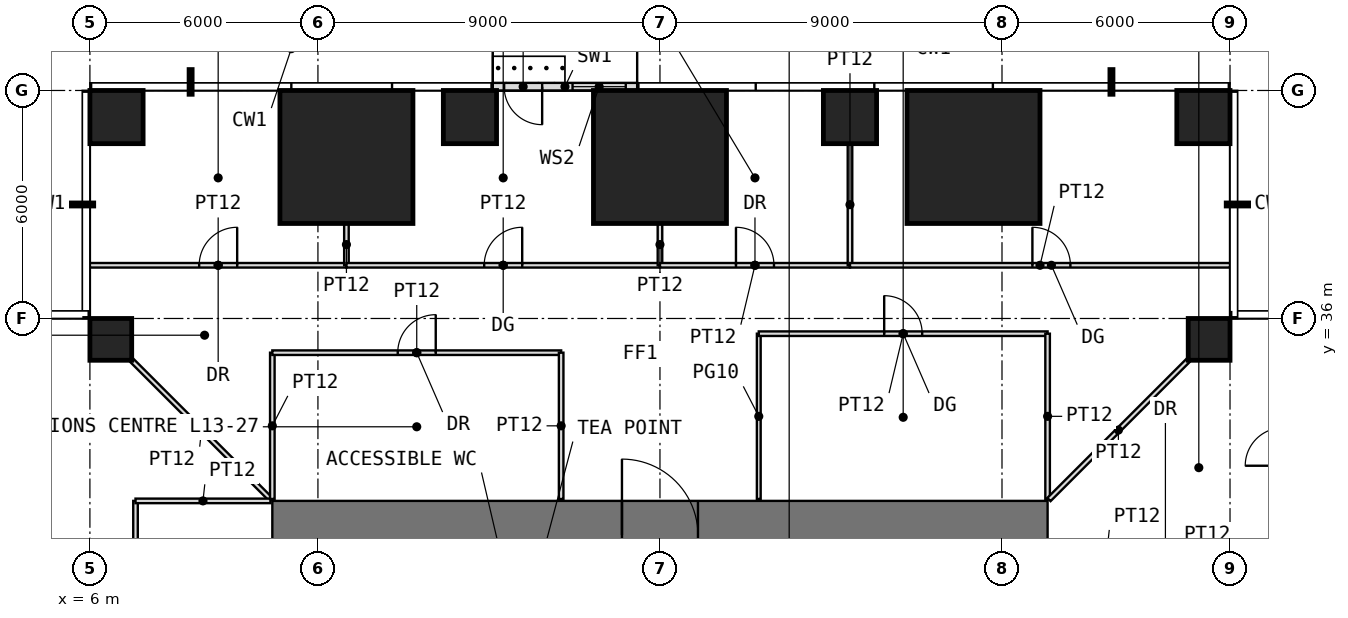
"""IFC4 building model, lengths in metres.
Left out: names, types, materials, properties, quantities, classifications, styles, units other than length and angle.
Written with IfcOpenShell. Run it as: python <this file> out.ifc"""

import sys

from ifc_helpers import new_model, si_unit, direction, frame, frame_2d, origin, origin_2d, place, context, subcontext, project, spatial, rectangle, extrude, element, fill, save


model = new_model("IFC4")
c1 = context("Model", 3, precision=1e-05, world=origin(), true_north=direction((0.0, 1.0)))
c2 = subcontext(c1, "Body", "Model", "MODEL_VIEW")
j1 = project(units=[si_unit("LENGTHUNIT", "METRE"), si_unit("PLANEANGLEUNIT", "RADIAN")], contexts=[c1])
p1 = place(None, origin())
s1 = spatial("IfcSite", under=j1, at=p1, CompositionType="ELEMENT")
p2 = place(p1, origin())
s2 = spatial("IfcBuilding", under=s1, at=p2, CompositionType="ELEMENT")
p3 = place(p2, frame((0.0, 0.0, 58.5)))
s3 = spatial("IfcBuildingStorey", under=s2, at=p3, CompositionType="ELEMENT", Elevation=58.5)
for number, where, z_axis, x_axis in (
    (1, (6.55, 35.45, 0.0), (0.0, 0.0, 1.0), (1.0, 0.0, 0.0)),
    (2, (35.45, 35.45, 0.0), (0.0, 0.0, 1.0), (1.0, 0.0, 0.0)),
):
    element("IfcColumn", number, at=place(p3, frame(where, z_axis=z_axis, x_axis=x_axis)), inside=s3, PredefinedType="COLUMN", context=c2, shape_type="SweptSolid", body=[
        extrude(rectangle(XDim=1.1, YDim=1.1, at=origin_2d()), origin(), (0.0, 0.0, 1.0), 4.0),
    ])
p4 = place(p3, frame((6.7, 41.3, 0.0), z_axis=(0.0, 0.0, 1.0), x_axis=(1.0, 0.0, 0.0)))
e3 = element("IfcColumn", 3, at=p4, inside=s3, PredefinedType="COLUMN", context=c2, shape_type="SweptSolid", body=[
    extrude(rectangle(XDim=1.4, YDim=1.4, at=origin_2d()), origin(), (0.0, 0.0, 1.0), 4.0),
])
p5 = place(p3, frame((12.75, 40.25, 0.0), z_axis=(0.0, 0.0, 1.0), x_axis=(1.0, 0.0, 0.0)))
e4 = element("IfcColumn", 4, at=p5, inside=s3, PredefinedType="COLUMN", context=c2, shape_type="SweptSolid", body=[
    extrude(rectangle(XDim=3.5, YDim=3.5, at=origin_2d()), origin(), (0.0, 0.0, 1.0), 4.0),
])
p6 = place(p3, frame((16.0, 41.3, 0.0), z_axis=(0.0, 0.0, 1.0), x_axis=(1.0, 0.0, 0.0)))
e5 = element("IfcColumn", 5, at=p6, inside=s3, PredefinedType="COLUMN", context=c2, shape_type="SweptSolid", body=[
    extrude(rectangle(XDim=1.4, YDim=1.4, at=origin_2d()), origin(), (0.0, 0.0, 1.0), 4.0),
])
p7 = place(p3, frame((21.0, 40.25, 0.0), z_axis=(0.0, 0.0, 1.0), x_axis=(1.0, 0.0, 0.0)))
e6 = element("IfcColumn", 6, at=p7, inside=s3, PredefinedType="COLUMN", context=c2, shape_type="SweptSolid", body=[
    extrude(rectangle(XDim=3.5, YDim=3.5, at=origin_2d()), origin(), (0.0, 0.0, 1.0), 4.0),
])
p8 = place(p3, frame((26.0, 41.3, 0.0), z_axis=(0.0, 0.0, 1.0), x_axis=(1.0, 0.0, 0.0)))
e7 = element("IfcColumn", 7, at=p8, inside=s3, PredefinedType="COLUMN", context=c2, shape_type="SweptSolid", body=[
    extrude(rectangle(XDim=1.4, YDim=1.4, at=origin_2d()), origin(), (0.0, 0.0, 1.0), 4.0),
])
p9 = place(p3, frame((29.25, 40.25, 0.0), z_axis=(0.0, 0.0, 1.0), x_axis=(1.0, 0.0, 0.0)))
e8 = element("IfcColumn", 8, at=p9, inside=s3, PredefinedType="COLUMN", context=c2, shape_type="SweptSolid", body=[
    extrude(rectangle(XDim=3.5, YDim=3.5, at=origin_2d()), origin(), (0.0, 0.0, 1.0), 4.0),
])
p10 = place(p3, frame((35.3, 41.3, 0.0), z_axis=(0.0, 0.0, 1.0), x_axis=(1.0, 0.0, 0.0)))
e9 = element("IfcColumn", 9, at=p10, inside=s3, PredefinedType="COLUMN", context=c2, shape_type="SweptSolid", body=[
    extrude(rectangle(XDim=1.4, YDim=1.4, at=origin_2d()), origin(), (0.0, 0.0, 1.0), 4.0),
])
p11 = place(p3, frame((20.4, 42.1, 0.0), z_axis=(0.0, 0.0, 1.0), x_axis=(-1.0, 0.0, 0.0)))
e10 = element("IfcWall", 10, at=p11, inside=s3, PredefinedType="USERDEFINED", context=c2, shape_type="SweptSolid", body=[
    extrude(rectangle(XDim=3.8, YDim=0.2, at=frame_2d((1.9, 0.0))), origin(), (0.0, 0.0, 1.0), 3.75),
])
p12 = place(p11, frame((2.5, 0.0, 0.0)))
e11 = element("IfcOpeningElement", 11, at=p12, cuts=e10, PredefinedType="OPENING", context=c2, shape_type="SweptSolid", body=[
    extrude(rectangle(XDim=1.0, YDim=2.4, at=frame_2d((0.5, 1.2))), frame((0.0, 0.11, 0.0), z_axis=(0.0, -1.0, 0.0), x_axis=(1.0, 0.0, 0.0)), (0.0, 0.0, 1.0), 0.22),
])
p13 = place(p11, frame((0.3, 0.0, 0.3)))
e12 = element("IfcOpeningElement", 12, at=p13, cuts=e10, PredefinedType="OPENING", context=c2, shape_type="SweptSolid", body=[
    extrude(rectangle(XDim=1.4, YDim=2.7, at=frame_2d((0.7, 1.35))), frame((0.0, 0.11, 0.0), z_axis=(0.0, -1.0, 0.0), x_axis=(1.0, 0.0, 0.0)), (0.0, 0.0, 1.0), 0.22),
])
p14 = place(p3, frame((10.8, 30.3, -0.05), z_axis=(0.0, 0.0, 1.0), x_axis=(1.0, 0.0, 0.0)))
e13 = element("IfcWall", 13, at=p14, inside=s3, PredefinedType="SHEAR", context=c2, shape_type="SweptSolid", body=[
    extrude(rectangle(XDim=20.4, YDim=1.8, at=frame_2d((10.2, 0.0))), origin(), (0.0, 0.0, 1.0), 4.0),
])
p15 = place(p14, frame((9.2, 0.0, 0.05)))
e14 = element("IfcOpeningElement", 14, at=p15, cuts=e13, PredefinedType="OPENING", context=c2, shape_type="SweptSolid", body=[
    extrude(rectangle(XDim=2.0, YDim=2.2, at=frame_2d((1.0, 1.1))), frame((0.0, 0.91, 0.0), z_axis=(0.0, -1.0, 0.0), x_axis=(1.0, 0.0, 0.0)), (0.0, 0.0, 1.0), 1.82),
])
p16 = place(p3, frame((6.0, 37.4, 0.0), z_axis=(0.0, 0.0, 1.0), x_axis=(1.0, 0.0, 0.0)))
e15 = element("IfcWall", 15, at=p16, inside=s3, PredefinedType="PARTITIONING", context=c2, shape_type="SweptSolid", body=[
    extrude(rectangle(XDim=6.75, YDim=0.12, at=frame_2d((3.375, 0.0))), origin(), (0.0, 0.0, 1.0), 3.75),
])
p17 = place(p16, frame((2.875, 0.0, 0.0)))
e16 = element("IfcOpeningElement", 16, at=p17, cuts=e15, PredefinedType="OPENING", context=c2, shape_type="SweptSolid", body=[
    extrude(rectangle(XDim=1.0, YDim=2.2, at=frame_2d((0.5, 1.1))), frame((0.0, 0.07, 0.0), z_axis=(0.0, -1.0, 0.0), x_axis=(1.0, 0.0, 0.0)), (0.0, 0.0, 1.0), 0.14),
])
p18 = place(p3, frame((7.11, 34.89, 0.0), z_axis=(0.0, 0.0, 1.0), x_axis=(0.707106781187, -0.707106781187, 0.0)))
e17 = element("IfcWall", 17, at=p18, inside=s3, PredefinedType="PARTITIONING", context=c2, shape_type="SweptSolid", body=[
    extrude(rectangle(XDim=5.168, YDim=0.12, at=frame_2d((2.584, 0.0))), origin(), (0.0, 0.0, 1.0), 3.75),
])
p19 = place(p3, frame((7.2, 24.6, 0.0), z_axis=(0.0, 0.0, 1.0), x_axis=(0.0, 1.0, 0.0)))
e18 = element("IfcWall", 18, at=p19, inside=s3, PredefinedType="PARTITIONING", context=c2, shape_type="SweptSolid", body=[
    extrude(rectangle(XDim=6.6, YDim=0.12, at=frame_2d((3.3, 0.0))), origin(), (0.0, 0.0, 1.0), 3.75),
])
p20 = place(p19, frame((2.8, 0.0, 0.0)))
e19 = element("IfcOpeningElement", 19, at=p20, cuts=e18, PredefinedType="OPENING", context=c2, shape_type="SweptSolid", body=[
    extrude(rectangle(XDim=1.0, YDim=2.4, at=frame_2d((0.5, 1.2))), frame((0.0, 0.07, 0.0), z_axis=(0.0, -1.0, 0.0), x_axis=(1.0, 0.0, 0.0)), (0.0, 0.0, 1.0), 0.14),
])
p21 = place(p3, frame((7.2, 31.2, 0.0), z_axis=(0.0, 0.0, 1.0), x_axis=(1.0, 0.0, 0.0)))
e20 = element("IfcWall", 20, at=p21, inside=s3, PredefinedType="PARTITIONING", context=c2, shape_type="SweptSolid", body=[
    extrude(rectangle(XDim=3.55, YDim=0.12, at=frame_2d((1.775, 0.0))), origin(), (0.0, 0.0, 1.0), 3.75),
])
p22 = place(p3, frame((10.8, 31.25, 0.0), z_axis=(0.0, 0.0, 1.0), x_axis=(0.0, 1.0, 0.0)))
e21 = element("IfcWall", 21, at=p22, inside=s3, PredefinedType="PARTITIONING", context=c2, shape_type="SweptSolid", body=[
    extrude(rectangle(XDim=3.85, YDim=0.12, at=frame_2d((1.925, 0.0))), origin(), (0.0, 0.0, 1.0), 3.75),
])
p23 = place(p3, frame((10.8, 35.1, 0.0), z_axis=(0.0, 0.0, 1.0), x_axis=(1.0, 0.0, 0.0)))
e22 = element("IfcWall", 22, at=p23, inside=s3, PredefinedType="PARTITIONING", context=c2, shape_type="SweptSolid", body=[
    extrude(rectangle(XDim=7.6, YDim=0.12, at=frame_2d((3.8, 0.0))), origin(), (0.0, 0.0, 1.0), 3.75),
])
p24 = place(p23, frame((3.3, 0.0, 0.0)))
e23 = element("IfcOpeningElement", 23, at=p24, cuts=e22, PredefinedType="OPENING", context=c2, shape_type="SweptSolid", body=[
    extrude(rectangle(XDim=1.0, YDim=2.2, at=frame_2d((0.5, 1.1))), frame((0.0, 0.07, 0.0), z_axis=(0.0, -1.0, 0.0), x_axis=(1.0, 0.0, 0.0)), (0.0, 0.0, 1.0), 0.14),
])
p25 = place(p3, frame((12.75, 37.4, 0.0), z_axis=(0.0, 0.0, 1.0), x_axis=(0.0, 1.0, 0.0)))
e24 = element("IfcWall", 24, at=p25, inside=s3, PredefinedType="PARTITIONING", context=c2, shape_type="SweptSolid", body=[
    extrude(rectangle(XDim=1.09, YDim=0.12, at=frame_2d((0.545, 0.0))), origin(), (0.0, 0.0, 1.0), 3.75),
])
p26 = place(p3, frame((12.75, 37.4, 0.0), z_axis=(0.0, 0.0, 1.0), x_axis=(1.0, 0.0, 0.0)))
e25 = element("IfcWall", 25, at=p26, inside=s3, PredefinedType="PARTITIONING", context=c2, shape_type="SweptSolid", body=[
    extrude(rectangle(XDim=8.25, YDim=0.12, at=frame_2d((4.125, 0.0))), origin(), (0.0, 0.0, 1.0), 3.75),
])
p27 = place(p26, frame((3.625, 0.0, 0.0)))
e26 = element("IfcOpeningElement", 26, at=p27, cuts=e25, PredefinedType="OPENING", context=c2, shape_type="SweptSolid", body=[
    extrude(rectangle(XDim=1.0, YDim=2.4, at=frame_2d((0.5, 1.2))), frame((0.0, 0.07, 0.0), z_axis=(0.0, -1.0, 0.0), x_axis=(1.0, 0.0, 0.0)), (0.0, 0.0, 1.0), 0.14),
])
p28 = place(p3, frame((18.4, 31.25, 0.0), z_axis=(0.0, 0.0, 1.0), x_axis=(0.0, 1.0, 0.0)))
e27 = element("IfcWall", 27, at=p28, inside=s3, PredefinedType="PARTITIONING", context=c2, shape_type="SweptSolid", body=[
    extrude(rectangle(XDim=3.85, YDim=0.12, at=frame_2d((1.925, 0.0))), origin(), (0.0, 0.0, 1.0), 3.75),
])
p29 = place(p3, frame((21.0, 37.4, 0.0), z_axis=(0.0, 0.0, 1.0), x_axis=(0.0, 1.0, 0.0)))
e28 = element("IfcWall", 28, at=p29, inside=s3, PredefinedType="PARTITIONING", context=c2, shape_type="SweptSolid", body=[
    extrude(rectangle(XDim=1.09, YDim=0.12, at=frame_2d((0.545, 0.0))), origin(), (0.0, 0.0, 1.0), 3.75),
])
p30 = place(p3, frame((21.0, 37.4, 0.0), z_axis=(0.0, 0.0, 1.0), x_axis=(1.0, 0.0, 0.0)))
e29 = element("IfcWall", 29, at=p30, inside=s3, PredefinedType="PARTITIONING", context=c2, shape_type="SweptSolid", body=[
    extrude(rectangle(XDim=5.0, YDim=0.12, at=frame_2d((2.5, 0.0))), origin(), (0.0, 0.0, 1.0), 3.75),
])
p31 = place(p30, frame((2.0, 0.0, 0.0)))
e30 = element("IfcOpeningElement", 30, at=p31, cuts=e29, PredefinedType="OPENING", context=c2, shape_type="SweptSolid", body=[
    extrude(rectangle(XDim=1.0, YDim=2.2, at=frame_2d((0.5, 1.1))), frame((0.0, 0.07, 0.0), z_axis=(0.0, -1.0, 0.0), x_axis=(1.0, 0.0, 0.0)), (0.0, 0.0, 1.0), 0.14),
])
p32 = place(p3, frame((23.6, 31.25, 0.0), z_axis=(0.0, 0.0, 1.0), x_axis=(0.0, 1.0, 0.0)))
e31 = element("IfcWall", 31, at=p32, inside=s3, PredefinedType="PARTITIONING", context=c2, shape_type="SweptSolid", body=[
    extrude(rectangle(XDim=4.35, YDim=0.1, at=frame_2d((2.175, 0.0))), origin(), (0.0, 0.0, 1.0), 3.75),
])
p33 = place(p3, frame((23.6, 35.6, 0.0), z_axis=(0.0, 0.0, 1.0), x_axis=(1.0, 0.0, 0.0)))
e32 = element("IfcWall", 32, at=p33, inside=s3, PredefinedType="PARTITIONING", context=c2, shape_type="SweptSolid", body=[
    extrude(rectangle(XDim=7.6, YDim=0.12, at=frame_2d((3.8, 0.0))), origin(), (0.0, 0.0, 1.0), 3.75),
])
p34 = place(p33, frame((3.3, 0.0, 0.0)))
e33 = element("IfcOpeningElement", 33, at=p34, cuts=e32, PredefinedType="OPENING", context=c2, shape_type="SweptSolid", body=[
    extrude(rectangle(XDim=1.0, YDim=2.4, at=frame_2d((0.5, 1.2))), frame((0.0, 0.07, 0.0), z_axis=(0.0, -1.0, 0.0), x_axis=(1.0, 0.0, 0.0)), (0.0, 0.0, 1.0), 0.14),
])
p35 = place(p3, frame((26.0, 37.4, 0.0), z_axis=(0.0, 0.0, 1.0), x_axis=(0.0, 1.0, 0.0)))
e34 = element("IfcWall", 34, at=p35, inside=s3, PredefinedType="PARTITIONING", context=c2, shape_type="SweptSolid", body=[
    extrude(rectangle(XDim=3.19, YDim=0.12, at=frame_2d((1.595, 0.0))), origin(), (0.0, 0.0, 1.0), 3.75),
])
p36 = place(p3, frame((26.0, 37.4, 0.0), z_axis=(0.0, 0.0, 1.0), x_axis=(1.0, 0.0, 0.0)))
e35 = element("IfcWall", 35, at=p36, inside=s3, PredefinedType="PARTITIONING", context=c2, shape_type="SweptSolid", body=[
    extrude(rectangle(XDim=10.0, YDim=0.12, at=frame_2d((5.0, 0.0))), origin(), (0.0, 0.0, 1.0), 3.75),
])
p37 = place(p36, frame((4.8, 0.0, 0.0)))
e36 = element("IfcOpeningElement", 36, at=p37, cuts=e35, PredefinedType="OPENING", context=c2, shape_type="SweptSolid", body=[
    extrude(rectangle(XDim=1.0, YDim=2.4, at=frame_2d((0.5, 1.2))), frame((0.0, 0.07, 0.0), z_axis=(0.0, -1.0, 0.0), x_axis=(1.0, 0.0, 0.0)), (0.0, 0.0, 1.0), 0.14),
])
p38 = place(p3, frame((31.2, 31.25, 0.0), z_axis=(0.0, 0.0, 1.0), x_axis=(0.0, 1.0, 0.0)))
e37 = element("IfcWall", 37, at=p38, inside=s3, PredefinedType="PARTITIONING", context=c2, shape_type="SweptSolid", body=[
    extrude(rectangle(XDim=4.35, YDim=0.12, at=frame_2d((2.175, 0.0))), origin(), (0.0, 0.0, 1.0), 3.75),
])
p39 = place(p3, frame((31.235, 31.235, 0.0), z_axis=(0.0, 0.0, 1.0), x_axis=(0.707106781187, 0.707106781187, 0.0)))
e38 = element("IfcWall", 38, at=p39, inside=s3, PredefinedType="PARTITIONING", context=c2, shape_type="SweptSolid", body=[
    extrude(rectangle(XDim=5.168, YDim=0.12, at=frame_2d((2.584, 0.0))), origin(), (0.0, 0.0, 1.0), 3.75),
])
p40 = place(p12, origin())
e39 = element("IfcDoor", 39, at=p40, inside=s3, OperationType="SINGLE_SWING_LEFT", PredefinedType="DOOR", context=c2, shape_type="SweptSolid", body=[
    extrude(rectangle(XDim=1.0, YDim=2.4, at=frame_2d((0.5, 1.2))), frame((0.0, 0.025, 0.0), z_axis=(0.0, -1.0, 0.0), x_axis=(1.0, 0.0, 0.0)), (0.0, 0.0, 1.0), 0.05),
])
fill(e11, e39)
p41 = place(p13, origin())
e40 = element("IfcWindow", 40, at=p41, inside=s3, PartitioningType="SINGLE_PANEL", PredefinedType="WINDOW", context=c2, shape_type="SweptSolid", body=[
    extrude(rectangle(XDim=1.4, YDim=2.7, at=frame_2d((0.7, 1.35))), frame((0.0, 0.03, 0.0), z_axis=(0.0, -1.0, 0.0), x_axis=(1.0, 0.0, 0.0)), (0.0, 0.0, 1.0), 0.06),
])
fill(e12, e40)
p42 = place(p15, origin())
e41 = element("IfcDoor", 41, at=p42, inside=s3, OperationType="DOUBLE_DOOR_SINGLE_SWING", PredefinedType="DOOR", context=c2, shape_type="SweptSolid", body=[
    extrude(rectangle(XDim=2.0, YDim=2.2, at=frame_2d((1.0, 1.1))), frame((0.0, 0.025, 0.0), z_axis=(0.0, -1.0, 0.0), x_axis=(1.0, 0.0, 0.0)), (0.0, 0.0, 1.0), 0.05),
])
fill(e14, e41)
p43 = place(p24, origin())
e42 = element("IfcDoor", 42, at=p43, inside=s3, OperationType="SINGLE_SWING_RIGHT", PredefinedType="DOOR", context=c2, shape_type="SweptSolid", body=[
    extrude(rectangle(XDim=1.0, YDim=2.2, at=frame_2d((0.5, 1.1))), frame((0.0, 0.025, 0.0), z_axis=(0.0, -1.0, 0.0), x_axis=(1.0, 0.0, 0.0)), (0.0, 0.0, 1.0), 0.05),
])
fill(e23, e42)
p44 = place(p34, origin())
e43 = element("IfcDoor", 43, at=p44, inside=s3, OperationType="SINGLE_SWING_LEFT", PredefinedType="DOOR", context=c2, shape_type="SweptSolid", body=[
    extrude(rectangle(XDim=1.0, YDim=2.4, at=frame_2d((0.5, 1.2))), frame((0.0, 0.025, 0.0), z_axis=(0.0, -1.0, 0.0), x_axis=(1.0, 0.0, 0.0)), (0.0, 0.0, 1.0), 0.05),
])
fill(e33, e43)
p45 = place(p17, origin())
e44 = element("IfcDoor", 44, at=p45, inside=s3, OperationType="SINGLE_SWING_RIGHT", PredefinedType="DOOR", context=c2, shape_type="SweptSolid", body=[
    extrude(rectangle(XDim=1.0, YDim=2.2, at=frame_2d((0.5, 1.1))), frame((0.0, 0.025, 0.0), z_axis=(0.0, -1.0, 0.0), x_axis=(1.0, 0.0, 0.0)), (0.0, 0.0, 1.0), 0.05),
])
fill(e16, e44)
p46 = place(p31, origin())
e45 = element("IfcDoor", 45, at=p46, inside=s3, OperationType="SINGLE_SWING_LEFT", PredefinedType="DOOR", context=c2, shape_type="SweptSolid", body=[
    extrude(rectangle(XDim=1.0, YDim=2.2, at=frame_2d((0.5, 1.1))), frame((0.0, 0.025, 0.0), z_axis=(0.0, -1.0, 0.0), x_axis=(1.0, 0.0, 0.0)), (0.0, 0.0, 1.0), 0.05),
])
fill(e30, e45)
p47 = place(p27, origin())
e46 = element("IfcDoor", 46, at=p47, inside=s3, OperationType="SINGLE_SWING_RIGHT", PredefinedType="DOOR", context=c2, shape_type="SweptSolid", body=[
    extrude(rectangle(XDim=1.0, YDim=2.4, at=frame_2d((0.5, 1.2))), frame((0.0, 0.025, 0.0), z_axis=(0.0, -1.0, 0.0), x_axis=(1.0, 0.0, 0.0)), (0.0, 0.0, 1.0), 0.05),
])
fill(e26, e46)
p48 = place(p37, origin())
e47 = element("IfcDoor", 47, at=p48, inside=s3, OperationType="SINGLE_SWING_LEFT", PredefinedType="DOOR", context=c2, shape_type="SweptSolid", body=[
    extrude(rectangle(XDim=1.0, YDim=2.4, at=frame_2d((0.5, 1.2))), frame((0.0, 0.025, 0.0), z_axis=(0.0, -1.0, 0.0), x_axis=(1.0, 0.0, 0.0)), (0.0, 0.0, 1.0), 0.05),
])
fill(e36, e47)
save(model, sys.argv[1])
